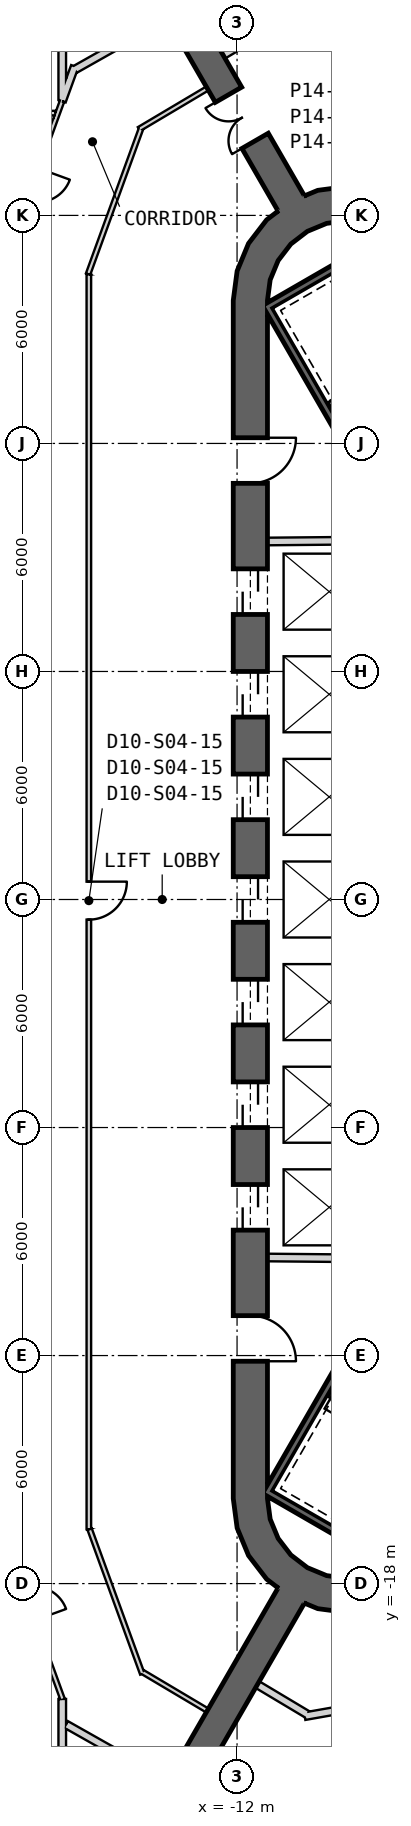
"""IFC4 building model, lengths in metres.
Left out: names, types, materials, properties, quantities, classifications, styles, units other than length and angle.
Written with IfcOpenShell. Run it as: python <this file> out.ifc"""

import sys

from ifc_helpers import new_model, si_unit, direction, frame, frame_2d, origin, place, context, subcontext, project, spatial, polyline, rectangle, outline, extrude, element, fill, save


model = new_model("IFC4")
c1 = context("Model", 3, precision=1e-05, world=origin(), true_north=direction((0.0, 1.0)))
c2 = subcontext(c1, "Body", "Model", "MODEL_VIEW")
j1 = project(units=[si_unit("LENGTHUNIT", "METRE"), si_unit("PLANEANGLEUNIT", "RADIAN")], contexts=[c1])
p1 = place(None, origin())
s1 = spatial("IfcSite", under=j1, at=p1, CompositionType="ELEMENT")
p2 = place(p1, origin())
s2 = spatial("IfcBuilding", under=s1, at=p2, CompositionType="ELEMENT")
p3 = place(p2, frame((0.0, 0.0, 94.7)))
s3 = spatial("IfcBuildingStorey", under=s2, at=p3, CompositionType="ELEMENT", Elevation=94.7)
p4 = place(p3, frame((-11.65, 15.762, 0.0), z_axis=(0.0, 0.0, 1.0), x_axis=(0.0, -1.0, 0.0)))
e1 = element("IfcWall", 1, at=p4, inside=s3, PredefinedType="SHEAR", context=c2, shape_type="SweptSolid", body=[
    extrude(rectangle(XDim=31.523, YDim=0.9, at=frame_2d((15.762, 0.0))), origin(), (0.0, 0.0, 1.0), 4.1),
])
p5 = place(p4, frame((7.062, 0.0, 0.0)))
e2 = element("IfcOpeningElement", 2, at=p5, cuts=e1, PredefinedType="OPENING", context=c2, shape_type="SweptSolid", body=[
    extrude(rectangle(XDim=1.2, YDim=2.4, at=frame_2d((0.6, 1.2))), frame((0.0, 0.46, 0.0), z_axis=(0.0, -1.0, 0.0), x_axis=(1.0, 0.0, 0.0)), (0.0, 0.0, 1.0), 0.92),
])
p6 = place(p4, frame((9.762, 0.0, 0.0)))
e3 = element("IfcOpeningElement", 3, at=p6, cuts=e1, PredefinedType="OPENING", context=c2, shape_type="SweptSolid", body=[
    extrude(rectangle(XDim=1.2, YDim=2.4, at=frame_2d((0.6, 1.2))), frame((0.0, 0.46, 0.0), z_axis=(0.0, -1.0, 0.0), x_axis=(1.0, 0.0, 0.0)), (0.0, 0.0, 1.0), 0.92),
])
p7 = place(p4, frame((12.462, 0.0, 0.0)))
e4 = element("IfcOpeningElement", 4, at=p7, cuts=e1, PredefinedType="OPENING", context=c2, shape_type="SweptSolid", body=[
    extrude(rectangle(XDim=1.2, YDim=2.4, at=frame_2d((0.6, 1.2))), frame((0.0, 0.46, 0.0), z_axis=(0.0, -1.0, 0.0), x_axis=(1.0, 0.0, 0.0)), (0.0, 0.0, 1.0), 0.92),
])
p8 = place(p4, frame((15.162, 0.0, 0.0)))
e5 = element("IfcOpeningElement", 5, at=p8, cuts=e1, PredefinedType="OPENING", context=c2, shape_type="SweptSolid", body=[
    extrude(rectangle(XDim=1.2, YDim=2.4, at=frame_2d((0.6, 1.2))), frame((0.0, 0.46, 0.0), z_axis=(0.0, -1.0, 0.0), x_axis=(1.0, 0.0, 0.0)), (0.0, 0.0, 1.0), 0.92),
])
p9 = place(p4, frame((17.862, 0.0, 0.0)))
e6 = element("IfcOpeningElement", 6, at=p9, cuts=e1, PredefinedType="OPENING", context=c2, shape_type="SweptSolid", body=[
    extrude(rectangle(XDim=1.2, YDim=2.4, at=frame_2d((0.6, 1.2))), frame((0.0, 0.46, 0.0), z_axis=(0.0, -1.0, 0.0), x_axis=(1.0, 0.0, 0.0)), (0.0, 0.0, 1.0), 0.92),
])
p10 = place(p4, frame((20.562, 0.0, 0.0)))
e7 = element("IfcOpeningElement", 7, at=p10, cuts=e1, PredefinedType="OPENING", context=c2, shape_type="SweptSolid", body=[
    extrude(rectangle(XDim=1.2, YDim=2.4, at=frame_2d((0.6, 1.2))), frame((0.0, 0.46, 0.0), z_axis=(0.0, -1.0, 0.0), x_axis=(1.0, 0.0, 0.0)), (0.0, 0.0, 1.0), 0.92),
])
p11 = place(p4, frame((23.262, 0.0, 0.0)))
e8 = element("IfcOpeningElement", 8, at=p11, cuts=e1, PredefinedType="OPENING", context=c2, shape_type="SweptSolid", body=[
    extrude(rectangle(XDim=1.2, YDim=2.4, at=frame_2d((0.6, 1.2))), frame((0.0, 0.46, 0.0), z_axis=(0.0, -1.0, 0.0), x_axis=(1.0, 0.0, 0.0)), (0.0, 0.0, 1.0), 0.92),
])
p12 = place(p4, frame((3.612, 0.0, 0.0)))
e9 = element("IfcOpeningElement", 9, at=p12, cuts=e1, PredefinedType="OPENING", context=c2, shape_type="SweptSolid", body=[
    extrude(rectangle(XDim=1.2, YDim=2.4, at=frame_2d((0.6, 1.2))), frame((0.0, 0.46, 0.0), z_axis=(0.0, -1.0, 0.0), x_axis=(1.0, 0.0, 0.0)), (0.0, 0.0, 1.0), 0.92),
])
p13 = place(p4, frame((26.712, 0.0, 0.0)))
e10 = element("IfcOpeningElement", 10, at=p13, cuts=e1, PredefinedType="OPENING", context=c2, shape_type="SweptSolid", body=[
    extrude(rectangle(XDim=1.2, YDim=2.4, at=frame_2d((0.6, 1.2))), frame((0.0, 0.46, 0.0), z_axis=(0.0, -1.0, 0.0), x_axis=(1.0, 0.0, 0.0)), (0.0, 0.0, 1.0), 0.92),
])
p14 = place(p3, origin())
e11 = element("IfcWall", 11, at=p14, inside=s3, PredefinedType="SHEAR", context=c2, shape_type="SweptSolid", body=[
    extrude(outline(polyline([(-7.6, 18.36), (-8.323, 18.659), (-9.1, 18.762), (-9.876, 18.659), (-10.6, 18.36), (-11.221, 17.883), (-11.698, 17.262), (-11.998, 16.538), (-12.1, 15.762), (-11.2, 15.762), (-11.128, 16.305), (-10.919, 16.812), (-10.585, 17.247), (-10.15, 17.58), (-9.644, 17.79), (-9.1, 17.862), (-8.556, 17.79), (-8.05, 17.58), (-7.6, 18.36)])), origin(), (0.0, 0.0, 1.0), 4.1),
])
p15 = place(p3, origin())
e12 = element("IfcWall", 12, at=p15, inside=s3, PredefinedType="SHEAR", context=c2, shape_type="SweptSolid", body=[
    extrude(outline(polyline([(-12.1, -15.762), (-11.998, -16.538), (-11.698, -17.262), (-11.221, -17.883), (-10.6, -18.36), (-9.876, -18.659), (-9.1, -18.762), (-8.323, -18.659), (-7.6, -18.36), (-8.05, -17.58), (-8.556, -17.79), (-9.1, -17.862), (-9.644, -17.79), (-10.15, -17.58), (-10.585, -17.247), (-10.919, -16.812), (-11.128, -16.305), (-11.2, -15.762), (-12.1, -15.762)])), origin(), (0.0, 0.0, 1.0), 4.1),
])
p16 = place(p3, frame((-10.575, 18.316, 0.0), z_axis=(0.0, 0.0, 1.0), x_axis=(-0.500006018292, 0.866021929094, 0.0)))
e13 = element("IfcWall", 13, at=p16, inside=s3, PredefinedType="SHEAR", context=c2, shape_type="SweptSolid", body=[
    extrude(rectangle(XDim=13.241, YDim=0.8, at=frame_2d((6.621, 0.0))), origin(), (0.0, 0.0, 1.0), 4.1),
])
p17 = place(p16, frame((1.9, 0.0, 0.0)))
e14 = element("IfcOpeningElement", 14, at=p17, cuts=e13, PredefinedType="OPENING", context=c2, shape_type="SweptSolid", body=[
    extrude(rectangle(XDim=1.4, YDim=2.4, at=frame_2d((0.7, 1.2))), frame((0.0, 0.41, 0.0), z_axis=(0.0, -1.0, 0.0), x_axis=(1.0, 0.0, 0.0)), (0.0, 0.0, 1.0), 0.82),
])
p18 = place(p3, frame((-10.575, -18.316, 0.0), z_axis=(0.0, 0.0, 1.0), x_axis=(-0.500006018292, -0.866021929094, 0.0)))
e15 = element("IfcWall", 15, at=p18, inside=s3, PredefinedType="SHEAR", context=c2, shape_type="SweptSolid", body=[
    extrude(rectangle(XDim=13.241, YDim=0.8, at=frame_2d((6.621, 0.0))), origin(), (0.0, 0.0, 1.0), 4.1),
])
p19 = place(p18, frame((6.35, 0.0, 0.0)))
e16 = element("IfcOpeningElement", 16, at=p19, cuts=e15, PredefinedType="OPENING", context=c2, shape_type="SweptSolid", body=[
    extrude(rectangle(XDim=1.4, YDim=2.4, at=frame_2d((0.7, 1.2))), frame((0.0, 0.41, 0.0), z_axis=(0.0, -1.0, 0.0), x_axis=(1.0, 0.0, 0.0)), (0.0, 0.0, 1.0), 0.82),
])
p20 = place(p3, frame((-11.2, 9.42, 0.0), z_axis=(0.0, 0.0, 1.0), x_axis=(0.999957167047, 0.009255488683, 0.0)))
e17 = element("IfcWall", 17, at=p20, inside=s3, PredefinedType="PLUMBINGWALL", context=c2, shape_type="SweptSolid", body=[
    extrude(rectangle(XDim=3.35, YDim=0.2, at=frame_2d((1.675, 0.0))), origin(), (0.0, 0.0, 1.0), 3.8),
])
p21 = place(p3, frame((-8.05, -9.449, 0.0), z_axis=(0.0, 0.0, 1.0), x_axis=(-0.999957467379, 0.009222983926, 0.0)))
e18 = element("IfcWall", 18, at=p21, inside=s3, PredefinedType="PLUMBINGWALL", context=c2, shape_type="SweptSolid", body=[
    extrude(rectangle(XDim=3.15, YDim=0.2, at=frame_2d((1.575, 0.0))), origin(), (0.0, 0.0, 1.0), 3.8),
])
p22 = place(p3, frame((-11.245, 15.678, -0.3), z_axis=(0.0, 0.0, 1.0), x_axis=(0.499977274689, -0.866038523851, 0.0)))
e19 = element("IfcWall", 19, at=p22, inside=s3, PredefinedType="SHEAR", context=c2, shape_type="SweptSolid", body=[
    extrude(rectangle(XDim=8.1, YDim=0.2, at=frame_2d((4.05, 0.0))), origin(), (0.0, 0.0, 1.0), 4.1),
])
for number, where, z_axis, x_axis in (
    (20, (-7.818, 17.541, -0.3), (0.0, 0.0, 1.0), (-0.866, -0.5, 0.0)),
    (21, (-11.282, -15.541, -0.3), (0.0, 0.0, 1.0), (0.866, -0.5, 0.0)),
):
    element("IfcWall", number, at=place(p3, frame(where, z_axis=z_axis, x_axis=x_axis)), inside=s3, PredefinedType="SHEAR", context=c2, shape_type="SweptSolid", body=[
        extrude(rectangle(XDim=3.8, YDim=0.2, at=frame_2d((1.9, 0.0))), origin(), (0.0, 0.0, 1.0), 4.1),
    ])
p23 = place(p3, frame((-7.196, -8.663, -0.3), z_axis=(0.0, 0.0, 1.0), x_axis=(-0.499997992926, -0.866026562566, 0.0)))
e22 = element("IfcWall", 22, at=p23, inside=s3, PredefinedType="SHEAR", context=c2, shape_type="SweptSolid", body=[
    extrude(rectangle(XDim=7.9, YDim=0.2, at=frame_2d((3.95, 0.0))), origin(), (0.0, 0.0, 1.0), 4.1),
])
p24 = place(p3, frame((-12.782, 21.339, 0.0), z_axis=(0.0, 0.0, 1.0), x_axis=(-0.859769901207, -0.510681619973, 0.0)))
e23 = element("IfcWall", 23, at=p24, inside=s3, PredefinedType="PARTITIONING", context=c2, shape_type="SweptSolid", body=[
    extrude(rectangle(XDim=2.093, YDim=0.12, at=frame_2d((1.046, 0.0))), origin(), (0.0, 0.0, 1.0), 3.8),
])
p25 = place(p3, frame((-14.528, 20.282, 0.0), z_axis=(0.0, 0.0, 1.0), x_axis=(-0.341969257767, -0.939711140054, 0.0)))
e24 = element("IfcWall", 24, at=p25, inside=s3, PredefinedType="PARTITIONING", context=c2, shape_type="SweptSolid", body=[
    extrude(rectangle(XDim=4.073, YDim=0.12, at=frame_2d((2.037, 0.0))), origin(), (0.0, 0.0, 1.0), 2.88),
])
p26 = place(p3, frame((-15.9, 16.451, 0.0), z_axis=(0.0, 0.0, 1.0), x_axis=(0.0, -1.0, 0.0)))
e25 = element("IfcWall", 25, at=p26, inside=s3, PredefinedType="PARTITIONING", context=c2, shape_type="SweptSolid", body=[
    extrude(rectangle(XDim=33.022, YDim=0.12, at=frame_2d((16.511, 0.0))), origin(), (0.0, 0.0, 1.0), 2.98),
])
p27 = place(p26, frame((15.981, 0.0, 0.0)))
e26 = element("IfcOpeningElement", 26, at=p27, cuts=e25, PredefinedType="OPENING", context=c2, shape_type="SweptSolid", body=[
    extrude(rectangle(XDim=1.0, YDim=2.1, at=frame_2d((0.5, 1.05))), frame((0.0, 0.07, 0.0), z_axis=(0.0, -1.0, 0.0), x_axis=(1.0, 0.0, 0.0)), (0.0, 0.0, 1.0), 0.14),
])
p28 = place(p3, frame((-15.879, -16.567, 0.0), z_axis=(0.0, 0.0, 1.0), x_axis=(0.341999322503, -0.939700198685, 0.0)))
e27 = element("IfcWall", 27, at=p28, inside=s3, PredefinedType="PARTITIONING", context=c2, shape_type="SweptSolid", body=[
    extrude(rectangle(XDim=4.054, YDim=0.12, at=frame_2d((2.027, 0.0))), origin(), (0.0, 0.0, 1.0), 2.88),
])
p29 = place(p3, frame((-14.494, -20.322, 0.0), z_axis=(0.0, 0.0, 1.0), x_axis=(0.859745408261, -0.510722853389, 0.0)))
e28 = element("IfcWall", 28, at=p29, inside=s3, PredefinedType="PARTITIONING", context=c2, shape_type="SweptSolid", body=[
    extrude(rectangle(XDim=1.991, YDim=0.12, at=frame_2d((0.996, 0.0))), origin(), (0.0, 0.0, 1.0), 3.8),
])
p30 = place(p3, frame((-16.5, -21.706, 0.0), z_axis=(0.0, 0.0, 1.0), x_axis=(0.870637705421, -0.491924776668, 0.0)))
e29 = element("IfcWall", 29, at=p30, inside=s3, PredefinedType="PARTITIONING", context=c2, shape_type="SweptSolid", body=[
    extrude(rectangle(XDim=3.036, YDim=0.2, at=frame_2d((1.518, 0.0))), origin(), (0.0, 0.0, 1.0), 3.8),
])
p31 = place(p3, frame((-16.271, 21.923, 0.0), z_axis=(0.0, 0.0, 1.0), x_axis=(-0.342165073447, -0.939639857878, 0.0)))
e30 = element("IfcWall", 30, at=p31, inside=s3, PredefinedType="PARTITIONING", context=c2, shape_type="SweptSolid", body=[
    extrude(rectangle(XDim=0.975, YDim=0.2, at=frame_2d((0.488, 0.0))), origin(), (0.0, 0.0, 1.0), 2.88),
])
p32 = place(p3, frame((-13.856, 23.2, 0.0), z_axis=(0.0, 0.0, 1.0), x_axis=(-0.870639942446, -0.491920817426, 0.0)))
e31 = element("IfcWall", 31, at=p32, inside=s3, PredefinedType="PARTITIONING", context=c2, shape_type="SweptSolid", body=[
    extrude(rectangle(XDim=2.771, YDim=0.2, at=frame_2d((1.386, 0.0))), origin(), (0.0, 0.0, 1.0), 3.8),
])
p33 = place(p3, frame((-16.605, 21.006, 0.0), z_axis=(0.0, 0.0, 1.0), x_axis=(-0.342014101174, -0.939694819927, 0.0)))
e32 = element("IfcWall", 32, at=p33, inside=s3, PredefinedType="PARTITIONING", context=c2, shape_type="SweptSolid", body=[
    extrude(rectangle(XDim=4.628, YDim=0.12, at=frame_2d((2.314, 0.0))), origin(), (0.0, 0.0, 1.0), 2.98),
])
p34 = place(p33, frame((1.871, 0.0, 0.0)))
e33 = element("IfcOpeningElement", 33, at=p34, cuts=e32, PredefinedType="OPENING", context=c2, shape_type="SweptSolid", body=[
    extrude(rectangle(XDim=0.9, YDim=2.1, at=frame_2d((0.45, 1.05))), frame((0.0, 0.07, 0.0), z_axis=(0.0, -1.0, 0.0), x_axis=(1.0, 0.0, 0.0)), (0.0, 0.0, 1.0), 0.14),
])
p35 = place(p3, frame((-17.019, -19.87, 0.0), z_axis=(0.0, 0.0, 1.0), x_axis=(0.341976406316, -0.939708538603, 0.0)))
e34 = element("IfcWall", 34, at=p35, inside=s3, PredefinedType="PARTITIONING", context=c2, shape_type="SweptSolid", body=[
    extrude(rectangle(XDim=1.26, YDim=0.12, at=frame_2d((0.63, 0.0))), origin(), (0.0, 0.0, 1.0), 2.88),
])
p36 = place(p3, frame((-10.339, 23.415, 0.0), z_axis=(0.0, 0.0, 1.0), x_axis=(-0.860316803263, -0.509759745393, 0.0)))
e35 = element("IfcWall", 35, at=p36, inside=s3, PredefinedType="PARTITIONING", context=c2, shape_type="SweptSolid", body=[
    extrude(rectangle(XDim=2.354, YDim=0.2, at=frame_2d((1.177, 0.0))), origin(), (0.0, 0.0, 1.0), 3.8),
])
p37 = place(p3, frame((-10.22, -21.49, 0.0), z_axis=(0.0, 0.0, 1.0), x_axis=(0.984805188344, 0.173662721995, 0.0)))
e36 = element("IfcWall", 36, at=p37, inside=s3, PredefinedType="PARTITIONING", context=c2, shape_type="SweptSolid", body=[
    extrude(rectangle(XDim=3.408, YDim=0.2, at=frame_2d((1.704, 0.0))), origin(), (0.0, 0.0, 1.0), 2.88),
])
p38 = place(p3, frame((-11.465, -20.657, 0.0), z_axis=(0.0, 0.0, 1.0), x_axis=(0.858376755127, -0.513019830276, 0.0)))
e37 = element("IfcWall", 37, at=p38, inside=s3, PredefinedType="PARTITIONING", context=c2, shape_type="SweptSolid", body=[
    extrude(rectangle(XDim=1.533, YDim=0.2, at=frame_2d((0.767, 0.0))), origin(), (0.0, 0.0, 1.0), 3.8),
])
p39 = place(p3, frame((-16.6, -22.577, 0.0), z_axis=(0.0, 0.0, 1.0), x_axis=(0.0, 1.0, 0.0)))
e38 = element("IfcWall", 38, at=p39, inside=s3, PredefinedType="PARTITIONING", context=c2, shape_type="SweptSolid", body=[
    extrude(rectangle(XDim=1.542, YDim=0.2, at=frame_2d((0.771, 0.0))), origin(), (0.0, 0.0, 1.0), 2.88),
])
p40 = place(p3, frame((-16.6, 21.036, 0.0), z_axis=(0.0, 0.0, 1.0), x_axis=(0.0, 1.0, 0.0)))
e39 = element("IfcWall", 39, at=p40, inside=s3, PredefinedType="PARTITIONING", context=c2, shape_type="SweptSolid", body=[
    extrude(rectangle(XDim=3.474, YDim=0.2, at=frame_2d((1.737, 0.0))), origin(), (0.0, 0.0, 1.0), 2.88),
])
p41 = place(p3, frame((-22.42, 20.692, 0.0), z_axis=(0.0, 0.0, 1.0), x_axis=(1.0, 0.0, 0.0)))
e40 = element("IfcWall", 40, at=p41, inside=s3, PredefinedType="PARTITIONING", context=c2, shape_type="SweptSolid", body=[
    extrude(rectangle(XDim=5.637, YDim=0.12, at=frame_2d((2.818, 0.0))), origin(), (0.0, 0.0, 1.0), 2.98),
])
p42 = place(p27, origin())
e41 = element("IfcDoor", 41, at=p42, inside=s3, OperationType="SINGLE_SWING_RIGHT", PredefinedType="NOTDEFINED", context=c2, shape_type="SweptSolid", body=[
    extrude(rectangle(XDim=1.0, YDim=2.1, at=frame_2d((0.5, 1.05))), frame((0.0, 0.025, 0.0), z_axis=(0.0, -1.0, 0.0), x_axis=(1.0, 0.0, 0.0)), (0.0, 0.0, 1.0), 0.05),
])
fill(e26, e41)
p43 = place(p5, origin())
e42 = element("IfcDoor", 42, at=p43, inside=s3, OperationType="SLIDING_TO_LEFT", PredefinedType="USERDEFINED", context=c2, shape_type="SweptSolid", body=[
    extrude(rectangle(XDim=1.2, YDim=2.4, at=frame_2d((0.6, 1.2))), frame((0.0, 0.025, 0.0), z_axis=(0.0, -1.0, 0.0), x_axis=(1.0, 0.0, 0.0)), (0.0, 0.0, 1.0), 0.05),
])
fill(e2, e42)
p44 = place(p6, origin())
e43 = element("IfcDoor", 43, at=p44, inside=s3, OperationType="SLIDING_TO_LEFT", PredefinedType="USERDEFINED", context=c2, shape_type="SweptSolid", body=[
    extrude(rectangle(XDim=1.2, YDim=2.4, at=frame_2d((0.6, 1.2))), frame((0.0, 0.025, 0.0), z_axis=(0.0, -1.0, 0.0), x_axis=(1.0, 0.0, 0.0)), (0.0, 0.0, 1.0), 0.05),
])
fill(e3, e43)
p45 = place(p7, origin())
e44 = element("IfcDoor", 44, at=p45, inside=s3, OperationType="SLIDING_TO_LEFT", PredefinedType="USERDEFINED", context=c2, shape_type="SweptSolid", body=[
    extrude(rectangle(XDim=1.2, YDim=2.4, at=frame_2d((0.6, 1.2))), frame((0.0, 0.025, 0.0), z_axis=(0.0, -1.0, 0.0), x_axis=(1.0, 0.0, 0.0)), (0.0, 0.0, 1.0), 0.05),
])
fill(e4, e44)
p46 = place(p8, origin())
e45 = element("IfcDoor", 45, at=p46, inside=s3, OperationType="SLIDING_TO_LEFT", PredefinedType="USERDEFINED", context=c2, shape_type="SweptSolid", body=[
    extrude(rectangle(XDim=1.2, YDim=2.4, at=frame_2d((0.6, 1.2))), frame((0.0, 0.025, 0.0), z_axis=(0.0, -1.0, 0.0), x_axis=(1.0, 0.0, 0.0)), (0.0, 0.0, 1.0), 0.05),
])
fill(e5, e45)
p47 = place(p9, origin())
e46 = element("IfcDoor", 46, at=p47, inside=s3, OperationType="SLIDING_TO_LEFT", PredefinedType="USERDEFINED", context=c2, shape_type="SweptSolid", body=[
    extrude(rectangle(XDim=1.2, YDim=2.4, at=frame_2d((0.6, 1.2))), frame((0.0, 0.025, 0.0), z_axis=(0.0, -1.0, 0.0), x_axis=(1.0, 0.0, 0.0)), (0.0, 0.0, 1.0), 0.05),
])
fill(e6, e46)
p48 = place(p10, origin())
e47 = element("IfcDoor", 47, at=p48, inside=s3, OperationType="SLIDING_TO_LEFT", PredefinedType="USERDEFINED", context=c2, shape_type="SweptSolid", body=[
    extrude(rectangle(XDim=1.2, YDim=2.4, at=frame_2d((0.6, 1.2))), frame((0.0, 0.025, 0.0), z_axis=(0.0, -1.0, 0.0), x_axis=(1.0, 0.0, 0.0)), (0.0, 0.0, 1.0), 0.05),
])
fill(e7, e47)
p49 = place(p11, origin())
e48 = element("IfcDoor", 48, at=p49, inside=s3, OperationType="SLIDING_TO_LEFT", PredefinedType="USERDEFINED", context=c2, shape_type="SweptSolid", body=[
    extrude(rectangle(XDim=1.2, YDim=2.4, at=frame_2d((0.6, 1.2))), frame((0.0, 0.025, 0.0), z_axis=(0.0, -1.0, 0.0), x_axis=(1.0, 0.0, 0.0)), (0.0, 0.0, 1.0), 0.05),
])
fill(e8, e48)
p50 = place(p12, origin())
e49 = element("IfcDoor", 49, at=p50, inside=s3, OperationType="SINGLE_SWING_LEFT", PredefinedType="USERDEFINED", context=c2, shape_type="SweptSolid", body=[
    extrude(rectangle(XDim=1.2, YDim=2.4, at=frame_2d((0.6, 1.2))), frame((0.0, 0.025, 0.0), z_axis=(0.0, -1.0, 0.0), x_axis=(1.0, 0.0, 0.0)), (0.0, 0.0, 1.0), 0.05),
])
fill(e9, e49)
p51 = place(p13, origin())
e50 = element("IfcDoor", 50, at=p51, inside=s3, OperationType="SINGLE_SWING_RIGHT", PredefinedType="USERDEFINED", context=c2, shape_type="SweptSolid", body=[
    extrude(rectangle(XDim=1.2, YDim=2.4, at=frame_2d((0.6, 1.2))), frame((0.0, 0.025, 0.0), z_axis=(0.0, -1.0, 0.0), x_axis=(1.0, 0.0, 0.0)), (0.0, 0.0, 1.0), 0.05),
])
fill(e10, e50)
p52 = place(p17, origin())
e51 = element("IfcDoor", 51, at=p52, inside=s3, OperationType="DOUBLE_DOOR_SINGLE_SWING", PredefinedType="NOTDEFINED", context=c2, shape_type="SweptSolid", body=[
    extrude(rectangle(XDim=1.4, YDim=2.4, at=frame_2d((0.7, 1.2))), frame((0.0, 0.025, 0.0), z_axis=(0.0, -1.0, 0.0), x_axis=(1.0, 0.0, 0.0)), (0.0, 0.0, 1.0), 0.05),
])
fill(e14, e51)
save(model, sys.argv[1])
